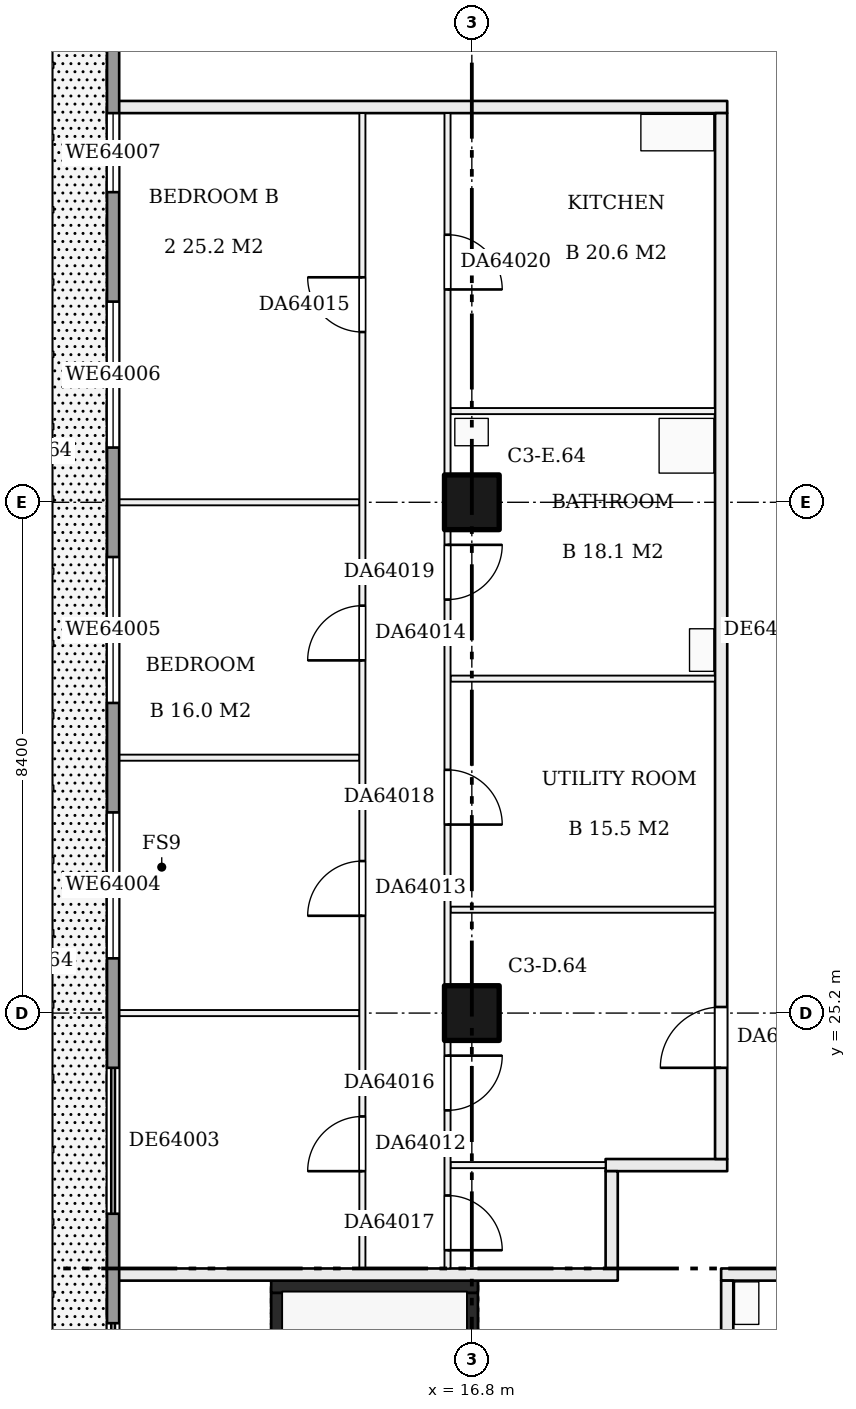
"""IFC4 building model, lengths in metres.
Left out: names, types, materials, properties, quantities, classifications, styles, units other than length and angle.
Written with IfcOpenShell. Run it as: python <this file> out.ifc"""

import sys

from ifc_helpers import new_model, si_unit, direction, frame, frame_2d, origin, origin_2d, place, context, subcontext, project, spatial, rectangle, extrude, element, fill, save


model = new_model("IFC4")
c1 = context("Model", 3, precision=1e-05, world=origin(), true_north=direction((0.0, 1.0)))
c2 = subcontext(c1, "Body", "Model", "MODEL_VIEW")
j1 = project(units=[si_unit("LENGTHUNIT", "METRE"), si_unit("PLANEANGLEUNIT", "RADIAN")], contexts=[c1])
p1 = place(None, origin())
s1 = spatial("IfcSite", under=j1, at=p1, CompositionType="ELEMENT")
p2 = place(p1, origin())
s2 = spatial("IfcBuilding", under=s1, at=p2, CompositionType="ELEMENT")
p3 = place(p2, frame((0.0, 0.0, 245.7)))
s3 = spatial("IfcBuildingStorey", under=s2, at=p3, CompositionType="ELEMENT", Elevation=245.7)
for number, where, z_axis, x_axis in (
    (1, (16.8, 25.2, 0.0), (0.0, 0.0, 1.0), (1.0, 0.0, 0.0)),
    (2, (16.8, 33.6, 0.0), (0.0, 0.0, 1.0), (1.0, 0.0, 0.0)),
):
    element("IfcColumn", number, at=place(p3, frame(where, z_axis=z_axis, x_axis=x_axis)), inside=s3, PredefinedType="COLUMN", context=c2, shape_type="SweptSolid", body=[
        extrude(rectangle(XDim=0.9, YDim=0.9, at=origin_2d()), origin(), (0.0, 0.0, 1.0), 3.22),
    ])
p4 = place(p3, frame((13.6, 13.8, 0.0), z_axis=(0.0, 0.0, 1.0), x_axis=(0.0, 1.0, 0.0)))
e3 = element("IfcWall", 3, at=p4, inside=s3, PredefinedType="SHEAR", context=c2, shape_type="SweptSolid", body=[
    extrude(rectangle(XDim=6.8, YDim=0.2, at=frame_2d((3.4, 0.0))), origin(), (0.0, 0.0, 1.0), 3.22),
])
p5 = place(p3, frame((16.8, 13.8, 0.0), z_axis=(0.0, 0.0, 1.0), x_axis=(0.0, 1.0, 0.0)))
e4 = element("IfcWall", 4, at=p5, inside=s3, PredefinedType="SHEAR", context=c2, shape_type="SweptSolid", body=[
    extrude(rectangle(XDim=6.8, YDim=0.2, at=frame_2d((3.4, 0.0))), origin(), (0.0, 0.0, 1.0), 3.22),
])
p6 = place(p5, frame((0.1, 0.0, 0.0)))
e5 = element("IfcOpeningElement", 5, at=p6, cuts=e4, PredefinedType="OPENING", context=c2, shape_type="SweptSolid", body=[
    extrude(rectangle(XDim=1.0, YDim=2.1, at=frame_2d((0.5, 1.05))), frame((0.0, 0.11, 0.0), z_axis=(0.0, -1.0, 0.0), x_axis=(1.0, 0.0, 0.0)), (0.0, 0.0, 1.0), 0.22),
])
p7 = place(p3, frame((13.5, 20.7, 0.0), z_axis=(0.0, 0.0, 1.0), x_axis=(1.0, 0.0, 0.0)))
e6 = element("IfcWall", 6, at=p7, inside=s3, PredefinedType="SHEAR", context=c2, shape_type="SweptSolid", body=[
    extrude(rectangle(XDim=3.4, YDim=0.2, at=frame_2d((1.7, 0.0))), origin(), (0.0, 0.0, 1.0), 3.22),
])
p8 = place(p3, frame((10.9, 20.9, 0.0), z_axis=(0.0, 0.0, 1.0), x_axis=(1.0, 0.0, 0.0)))
e7 = element("IfcWall", 7, at=p8, inside=s3, PredefinedType="PARTITIONING", context=c2, shape_type="SweptSolid", body=[
    extrude(rectangle(XDim=8.3, YDim=0.2, at=frame_2d((4.15, 0.0))), origin(), (0.0, 0.0, 1.0), 3.22),
])
p9 = place(p3, frame((20.9, 20.9, 0.0), z_axis=(0.0, 0.0, 1.0), x_axis=(1.0, 0.0, 0.0)))
e8 = element("IfcWall", 8, at=p9, inside=s3, PredefinedType="PARTITIONING", context=c2, shape_type="SweptSolid", body=[
    extrude(rectangle(XDim=19.3, YDim=0.2, at=frame_2d((9.65, 0.0))), origin(), (0.0, 0.0, 1.0), 3.22),
])
p10 = place(p9, frame((8.86, 0.0, 0.0)))
e9 = element("IfcOpeningElement", 9, at=p10, cuts=e8, PredefinedType="OPENING", context=c2, shape_type="SweptSolid", body=[
    extrude(rectangle(XDim=1.0, YDim=2.1, at=frame_2d((0.5, 1.05))), frame((0.0, 0.11, 0.0), z_axis=(0.0, -1.0, 0.0), x_axis=(1.0, 0.0, 0.0)), (0.0, 0.0, 1.0), 0.22),
])
p11 = place(p3, frame((16.45, 22.7, 0.0), z_axis=(0.0, 0.0, 1.0), x_axis=(1.0, 0.0, 0.0)))
e10 = element("IfcWall", 10, at=p11, inside=s3, PredefinedType="PARTITIONING", context=c2, shape_type="SweptSolid", body=[
    extrude(rectangle(XDim=2.55, YDim=0.1, at=frame_2d((1.275, 0.0))), origin(), (0.0, 0.0, 1.0), 3.22),
])
p12 = place(p3, frame((19.0, 22.7, 0.0), z_axis=(0.0, 0.0, 1.0), x_axis=(1.0, 0.0, 0.0)))
e11 = element("IfcWall", 11, at=p12, inside=s3, PredefinedType="PARTITIONING", context=c2, shape_type="SweptSolid", body=[
    extrude(rectangle(XDim=2.0, YDim=0.2, at=frame_2d((1.0, 0.0))), origin(), (0.0, 0.0, 1.0), 3.22),
])
p13 = place(p3, frame((10.9, 25.2, 0.0), z_axis=(0.0, 0.0, 1.0), x_axis=(1.0, 0.0, 0.0)))
e12 = element("IfcWall", 12, at=p13, inside=s3, PredefinedType="PARTITIONING", context=c2, shape_type="SweptSolid", body=[
    extrude(rectangle(XDim=4.05, YDim=0.1, at=frame_2d((2.025, 0.0))), origin(), (0.0, 0.0, 1.0), 3.22),
])
p14 = place(p3, frame((16.45, 26.9, 0.0), z_axis=(0.0, 0.0, 1.0), x_axis=(1.0, 0.0, 0.0)))
e13 = element("IfcWall", 13, at=p14, inside=s3, PredefinedType="PARTITIONING", context=c2, shape_type="SweptSolid", body=[
    extrude(rectangle(XDim=4.35, YDim=0.1, at=frame_2d((2.175, 0.0))), origin(), (0.0, 0.0, 1.0), 3.22),
])
p15 = place(p3, frame((10.9, 29.4, 0.0), z_axis=(0.0, 0.0, 1.0), x_axis=(1.0, 0.0, 0.0)))
e14 = element("IfcWall", 14, at=p15, inside=s3, PredefinedType="PARTITIONING", context=c2, shape_type="SweptSolid", body=[
    extrude(rectangle(XDim=4.05, YDim=0.1, at=frame_2d((2.025, 0.0))), origin(), (0.0, 0.0, 1.0), 3.22),
])
p16 = place(p3, frame((16.45, 30.7, 0.0), z_axis=(0.0, 0.0, 1.0), x_axis=(1.0, 0.0, 0.0)))
e15 = element("IfcWall", 15, at=p16, inside=s3, PredefinedType="PARTITIONING", context=c2, shape_type="SweptSolid", body=[
    extrude(rectangle(XDim=4.35, YDim=0.1, at=frame_2d((2.175, 0.0))), origin(), (0.0, 0.0, 1.0), 3.22),
])
p17 = place(p3, frame((10.9, 33.6, 0.0), z_axis=(0.0, 0.0, 1.0), x_axis=(1.0, 0.0, 0.0)))
e16 = element("IfcWall", 16, at=p17, inside=s3, PredefinedType="PARTITIONING", context=c2, shape_type="SweptSolid", body=[
    extrude(rectangle(XDim=4.05, YDim=0.1, at=frame_2d((2.025, 0.0))), origin(), (0.0, 0.0, 1.0), 3.22),
])
p18 = place(p3, frame((16.45, 35.1, 0.0), z_axis=(0.0, 0.0, 1.0), x_axis=(1.0, 0.0, 0.0)))
e17 = element("IfcWall", 17, at=p18, inside=s3, PredefinedType="PARTITIONING", context=c2, shape_type="SweptSolid", body=[
    extrude(rectangle(XDim=4.35, YDim=0.1, at=frame_2d((2.175, 0.0))), origin(), (0.0, 0.0, 1.0), 3.22),
])
p19 = place(p3, frame((10.9, 40.1, 0.0), z_axis=(0.0, 0.0, 1.0), x_axis=(1.0, 0.0, 0.0)))
e18 = element("IfcWall", 18, at=p19, inside=s3, PredefinedType="PARTITIONING", context=c2, shape_type="SweptSolid", body=[
    extrude(rectangle(XDim=10.1, YDim=0.2, at=frame_2d((5.05, 0.0))), origin(), (0.0, 0.0, 1.0), 3.22),
])
p20 = place(p3, frame((15.0, 21.0, 0.0), z_axis=(0.0, 0.0, 1.0), x_axis=(0.0, 1.0, 0.0)))
e19 = element("IfcWall", 19, at=p20, inside=s3, PredefinedType="PARTITIONING", context=c2, shape_type="SweptSolid", body=[
    extrude(rectangle(XDim=19.0, YDim=0.1, at=frame_2d((9.5, 0.0))), origin(), (0.0, 0.0, 1.0), 3.22),
])
p21 = place(p20, frame((1.6, 0.0, 0.0)))
e20 = element("IfcOpeningElement", 20, at=p21, cuts=e19, PredefinedType="OPENING", context=c2, shape_type="SweptSolid", body=[
    extrude(rectangle(XDim=0.9, YDim=2.1, at=frame_2d((0.45, 1.05))), frame((0.0, 0.06, 0.0), z_axis=(0.0, -1.0, 0.0), x_axis=(1.0, 0.0, 0.0)), (0.0, 0.0, 1.0), 0.12),
])
p22 = place(p20, frame((5.8, 0.0, 0.0)))
e21 = element("IfcOpeningElement", 21, at=p22, cuts=e19, PredefinedType="OPENING", context=c2, shape_type="SweptSolid", body=[
    extrude(rectangle(XDim=0.9, YDim=2.1, at=frame_2d((0.45, 1.05))), frame((0.0, 0.06, 0.0), z_axis=(0.0, -1.0, 0.0), x_axis=(1.0, 0.0, 0.0)), (0.0, 0.0, 1.0), 0.12),
])
p23 = place(p20, frame((10.0, 0.0, 0.0)))
e22 = element("IfcOpeningElement", 22, at=p23, cuts=e19, PredefinedType="OPENING", context=c2, shape_type="SweptSolid", body=[
    extrude(rectangle(XDim=0.9, YDim=2.1, at=frame_2d((0.45, 1.05))), frame((0.0, 0.06, 0.0), z_axis=(0.0, -1.0, 0.0), x_axis=(1.0, 0.0, 0.0)), (0.0, 0.0, 1.0), 0.12),
])
p24 = place(p20, frame((15.4, 0.0, 0.0)))
e23 = element("IfcOpeningElement", 23, at=p24, cuts=e19, PredefinedType="OPENING", context=c2, shape_type="SweptSolid", body=[
    extrude(rectangle(XDim=0.9, YDim=2.1, at=frame_2d((0.45, 1.05))), frame((0.0, 0.06, 0.0), z_axis=(0.0, -1.0, 0.0), x_axis=(1.0, 0.0, 0.0)), (0.0, 0.0, 1.0), 0.12),
])
p25 = place(p3, frame((16.4, 21.0, 0.0), z_axis=(0.0, 0.0, 1.0), x_axis=(0.0, 1.0, 0.0)))
e24 = element("IfcWall", 24, at=p25, inside=s3, PredefinedType="PARTITIONING", context=c2, shape_type="SweptSolid", body=[
    extrude(rectangle(XDim=19.0, YDim=0.1, at=frame_2d((9.5, 0.0))), origin(), (0.0, 0.0, 1.0), 3.22),
])
p26 = place(p25, frame((2.6, 0.0, 0.0)))
e25 = element("IfcOpeningElement", 25, at=p26, cuts=e24, PredefinedType="OPENING", context=c2, shape_type="SweptSolid", body=[
    extrude(rectangle(XDim=0.9, YDim=2.1, at=frame_2d((0.45, 1.05))), frame((0.0, 0.06, 0.0), z_axis=(0.0, -1.0, 0.0), x_axis=(1.0, 0.0, 0.0)), (0.0, 0.0, 1.0), 0.12),
])
p27 = place(p25, frame((0.3, 0.0, 0.0)))
e26 = element("IfcOpeningElement", 26, at=p27, cuts=e24, PredefinedType="OPENING", context=c2, shape_type="SweptSolid", body=[
    extrude(rectangle(XDim=0.9, YDim=2.1, at=frame_2d((0.45, 1.05))), frame((0.0, 0.06, 0.0), z_axis=(0.0, -1.0, 0.0), x_axis=(1.0, 0.0, 0.0)), (0.0, 0.0, 1.0), 0.12),
])
p28 = place(p25, frame((7.3, 0.0, 0.0)))
e27 = element("IfcOpeningElement", 27, at=p28, cuts=e24, PredefinedType="OPENING", context=c2, shape_type="SweptSolid", body=[
    extrude(rectangle(XDim=0.9, YDim=2.1, at=frame_2d((0.45, 1.05))), frame((0.0, 0.06, 0.0), z_axis=(0.0, -1.0, 0.0), x_axis=(1.0, 0.0, 0.0)), (0.0, 0.0, 1.0), 0.12),
])
p29 = place(p25, frame((11.0, 0.0, 0.0)))
e28 = element("IfcOpeningElement", 28, at=p29, cuts=e24, PredefinedType="OPENING", context=c2, shape_type="SweptSolid", body=[
    extrude(rectangle(XDim=0.9, YDim=2.1, at=frame_2d((0.45, 1.05))), frame((0.0, 0.06, 0.0), z_axis=(0.0, -1.0, 0.0), x_axis=(1.0, 0.0, 0.0)), (0.0, 0.0, 1.0), 0.12),
])
p30 = place(p25, frame((16.1, 0.0, 0.0)))
e29 = element("IfcOpeningElement", 29, at=p30, cuts=e24, PredefinedType="OPENING", context=c2, shape_type="SweptSolid", body=[
    extrude(rectangle(XDim=0.9, YDim=2.1, at=frame_2d((0.45, 1.05))), frame((0.0, 0.06, 0.0), z_axis=(0.0, -1.0, 0.0), x_axis=(1.0, 0.0, 0.0)), (0.0, 0.0, 1.0), 0.12),
])
p31 = place(p3, frame((19.1, 21.0, 0.0), z_axis=(0.0, 0.0, 1.0), x_axis=(0.0, 1.0, 0.0)))
e30 = element("IfcWall", 30, at=p31, inside=s3, PredefinedType="PARTITIONING", context=c2, shape_type="SweptSolid", body=[
    extrude(rectangle(XDim=1.6, YDim=0.2, at=frame_2d((0.8, 0.0))), origin(), (0.0, 0.0, 1.0), 3.22),
])
p32 = place(p3, frame((20.9, 22.8, 0.0), z_axis=(0.0, 0.0, 1.0), x_axis=(0.0, 1.0, 0.0)))
e31 = element("IfcWall", 31, at=p32, inside=s3, PredefinedType="PARTITIONING", context=c2, shape_type="SweptSolid", body=[
    extrude(rectangle(XDim=17.2, YDim=0.2, at=frame_2d((8.6, 0.0))), origin(), (0.0, 0.0, 1.0), 3.22),
])
p33 = place(p32, frame((1.5, 0.0, 0.0)))
e32 = element("IfcOpeningElement", 32, at=p33, cuts=e31, PredefinedType="OPENING", context=c2, shape_type="SweptSolid", body=[
    extrude(rectangle(XDim=1.0, YDim=2.1, at=frame_2d((0.5, 1.05))), frame((0.0, 0.11, 0.0), z_axis=(0.0, -1.0, 0.0), x_axis=(1.0, 0.0, 0.0)), (0.0, 0.0, 1.0), 0.22),
])
p34 = place(p3, frame((21.0, 13.7, 0.0), z_axis=(0.0, 0.0, 1.0), x_axis=(0.0, 1.0, 0.0)))
e33 = element("IfcWall", 33, at=p34, inside=s3, PredefinedType="PARTITIONING", context=c2, shape_type="SweptSolid", body=[
    extrude(rectangle(XDim=7.1, YDim=0.2, at=frame_2d((3.55, 0.0))), origin(), (0.0, 0.0, 1.0), 3.22),
])
p35 = place(p3, frame((10.9, 42.0, 0.0), z_axis=(0.0, 0.0, 1.0), x_axis=(0.0, -1.0, 0.0)))
e34 = element("IfcWall", 34, at=p35, inside=s3, PredefinedType="SOLIDWALL", context=c2, shape_type="SweptSolid", body=[
    extrude(rectangle(XDim=28.6, YDim=0.2, at=frame_2d((14.3, 0.0))), origin(), (0.0, 0.0, 1.0), 3.22),
])
p36 = place(p35, frame((25.9, 0.0, 0.0)))
e35 = element("IfcOpeningElement", 35, at=p36, cuts=e34, PredefinedType="OPENING", context=c2, shape_type="SweptSolid", body=[
    extrude(rectangle(XDim=2.4, YDim=2.2, at=frame_2d((1.2, 1.1))), frame((0.0, 0.11, 0.0), z_axis=(0.0, -1.0, 0.0), x_axis=(1.0, 0.0, 0.0)), (0.0, 0.0, 1.0), 0.22),
])
p37 = place(p35, frame((21.9, 0.0, 0.0)))
e36 = element("IfcOpeningElement", 36, at=p37, cuts=e34, PredefinedType="OPENING", context=c2, shape_type="SweptSolid", body=[
    extrude(rectangle(XDim=2.4, YDim=2.2, at=frame_2d((1.2, 1.1))), frame((0.0, 0.11, 0.0), z_axis=(0.0, -1.0, 0.0), x_axis=(1.0, 0.0, 0.0)), (0.0, 0.0, 1.0), 0.22),
])
p38 = place(p35, frame((17.7, 0.0, 0.0)))
e37 = element("IfcOpeningElement", 37, at=p38, cuts=e34, PredefinedType="OPENING", context=c2, shape_type="SweptSolid", body=[
    extrude(rectangle(XDim=2.4, YDim=2.2, at=frame_2d((1.2, 1.1))), frame((0.0, 0.11, 0.0), z_axis=(0.0, -1.0, 0.0), x_axis=(1.0, 0.0, 0.0)), (0.0, 0.0, 1.0), 0.22),
])
p39 = place(p35, frame((13.5, 0.0, 0.9)))
e38 = element("IfcOpeningElement", 38, at=p39, cuts=e34, PredefinedType="OPENING", context=c2, shape_type="SweptSolid", body=[
    extrude(rectangle(XDim=2.4, YDim=1.5, at=frame_2d((1.2, 0.75))), frame((0.0, 0.11, 0.0), z_axis=(0.0, -1.0, 0.0), x_axis=(1.0, 0.0, 0.0)), (0.0, 0.0, 1.0), 0.22),
])
p40 = place(p35, frame((9.3, 0.0, 0.9)))
e39 = element("IfcOpeningElement", 39, at=p40, cuts=e34, PredefinedType="OPENING", context=c2, shape_type="SweptSolid", body=[
    extrude(rectangle(XDim=2.4, YDim=1.5, at=frame_2d((1.2, 0.75))), frame((0.0, 0.11, 0.0), z_axis=(0.0, -1.0, 0.0), x_axis=(1.0, 0.0, 0.0)), (0.0, 0.0, 1.0), 0.22),
])
p41 = place(p35, frame((5.1, 0.0, 0.9)))
e40 = element("IfcOpeningElement", 40, at=p41, cuts=e34, PredefinedType="OPENING", context=c2, shape_type="SweptSolid", body=[
    extrude(rectangle(XDim=2.4, YDim=1.5, at=frame_2d((1.2, 0.75))), frame((0.0, 0.11, 0.0), z_axis=(0.0, -1.0, 0.0), x_axis=(1.0, 0.0, 0.0)), (0.0, 0.0, 1.0), 0.22),
])
p42 = place(p35, frame((2.0, 0.0, 0.9)))
e41 = element("IfcOpeningElement", 41, at=p42, cuts=e34, PredefinedType="OPENING", context=c2, shape_type="SweptSolid", body=[
    extrude(rectangle(XDim=1.3, YDim=1.5, at=frame_2d((0.65, 0.75))), frame((0.0, 0.11, 0.0), z_axis=(0.0, -1.0, 0.0), x_axis=(1.0, 0.0, 0.0)), (0.0, 0.0, 1.0), 0.22),
])
p43 = place(p21, origin())
e42 = element("IfcDoor", 42, at=p43, inside=s3, OperationType="SINGLE_SWING_LEFT", PredefinedType="DOOR", context=c2, shape_type="SweptSolid", body=[
    extrude(rectangle(XDim=0.9, YDim=2.1, at=frame_2d((0.45, 1.05))), frame((0.0, 0.025, 0.0), z_axis=(0.0, -1.0, 0.0), x_axis=(1.0, 0.0, 0.0)), (0.0, 0.0, 1.0), 0.05),
])
fill(e20, e42)
p44 = place(p22, origin())
e43 = element("IfcDoor", 43, at=p44, inside=s3, OperationType="SINGLE_SWING_LEFT", PredefinedType="DOOR", context=c2, shape_type="SweptSolid", body=[
    extrude(rectangle(XDim=0.9, YDim=2.1, at=frame_2d((0.45, 1.05))), frame((0.0, 0.025, 0.0), z_axis=(0.0, -1.0, 0.0), x_axis=(1.0, 0.0, 0.0)), (0.0, 0.0, 1.0), 0.05),
])
fill(e21, e43)
p45 = place(p23, origin())
e44 = element("IfcDoor", 44, at=p45, inside=s3, OperationType="SINGLE_SWING_LEFT", PredefinedType="DOOR", context=c2, shape_type="SweptSolid", body=[
    extrude(rectangle(XDim=0.9, YDim=2.1, at=frame_2d((0.45, 1.05))), frame((0.0, 0.025, 0.0), z_axis=(0.0, -1.0, 0.0), x_axis=(1.0, 0.0, 0.0)), (0.0, 0.0, 1.0), 0.05),
])
fill(e22, e44)
p46 = place(p24, origin())
e45 = element("IfcDoor", 45, at=p46, inside=s3, OperationType="SINGLE_SWING_RIGHT", PredefinedType="DOOR", context=c2, shape_type="SweptSolid", body=[
    extrude(rectangle(XDim=0.9, YDim=2.1, at=frame_2d((0.45, 1.05))), frame((0.0, 0.025, 0.0), z_axis=(0.0, -1.0, 0.0), x_axis=(1.0, 0.0, 0.0)), (0.0, 0.0, 1.0), 0.05),
])
fill(e23, e45)
p47 = place(p26, frame((0.9, 0.0, 0.0), z_axis=(0.0, 0.0, 1.0), x_axis=(-1.0, 0.0, 0.0)))
e46 = element("IfcDoor", 46, at=p47, inside=s3, OperationType="SINGLE_SWING_LEFT", PredefinedType="DOOR", context=c2, shape_type="SweptSolid", body=[
    extrude(rectangle(XDim=0.9, YDim=2.1, at=frame_2d((0.45, 1.05))), frame((0.0, 0.025, 0.0), z_axis=(0.0, -1.0, 0.0), x_axis=(1.0, 0.0, 0.0)), (0.0, 0.0, 1.0), 0.05),
])
fill(e25, e46)
p48 = place(p27, frame((0.9, 0.0, 0.0), z_axis=(0.0, 0.0, 1.0), x_axis=(-1.0, 0.0, 0.0)))
e47 = element("IfcDoor", 47, at=p48, inside=s3, OperationType="SINGLE_SWING_RIGHT", PredefinedType="DOOR", context=c2, shape_type="SweptSolid", body=[
    extrude(rectangle(XDim=0.9, YDim=2.1, at=frame_2d((0.45, 1.05))), frame((0.0, 0.025, 0.0), z_axis=(0.0, -1.0, 0.0), x_axis=(1.0, 0.0, 0.0)), (0.0, 0.0, 1.0), 0.05),
])
fill(e26, e47)
p49 = place(p28, frame((0.9, 0.0, 0.0), z_axis=(0.0, 0.0, 1.0), x_axis=(-1.0, 0.0, 0.0)))
e48 = element("IfcDoor", 48, at=p49, inside=s3, OperationType="SINGLE_SWING_RIGHT", PredefinedType="DOOR", context=c2, shape_type="SweptSolid", body=[
    extrude(rectangle(XDim=0.9, YDim=2.1, at=frame_2d((0.45, 1.05))), frame((0.0, 0.025, 0.0), z_axis=(0.0, -1.0, 0.0), x_axis=(1.0, 0.0, 0.0)), (0.0, 0.0, 1.0), 0.05),
])
fill(e27, e48)
p50 = place(p29, frame((0.9, 0.0, 0.0), z_axis=(0.0, 0.0, 1.0), x_axis=(-1.0, 0.0, 0.0)))
e49 = element("IfcDoor", 49, at=p50, inside=s3, OperationType="SINGLE_SWING_LEFT", PredefinedType="DOOR", context=c2, shape_type="SweptSolid", body=[
    extrude(rectangle(XDim=0.9, YDim=2.1, at=frame_2d((0.45, 1.05))), frame((0.0, 0.025, 0.0), z_axis=(0.0, -1.0, 0.0), x_axis=(1.0, 0.0, 0.0)), (0.0, 0.0, 1.0), 0.05),
])
fill(e28, e49)
p51 = place(p30, frame((0.9, 0.0, 0.0), z_axis=(0.0, 0.0, 1.0), x_axis=(-1.0, 0.0, 0.0)))
e50 = element("IfcDoor", 50, at=p51, inside=s3, OperationType="SINGLE_SWING_RIGHT", PredefinedType="DOOR", context=c2, shape_type="SweptSolid", body=[
    extrude(rectangle(XDim=0.9, YDim=2.1, at=frame_2d((0.45, 1.05))), frame((0.0, 0.025, 0.0), z_axis=(0.0, -1.0, 0.0), x_axis=(1.0, 0.0, 0.0)), (0.0, 0.0, 1.0), 0.05),
])
fill(e29, e50)
p52 = place(p33, origin())
e51 = element("IfcDoor", 51, at=p52, inside=s3, OperationType="SINGLE_SWING_LEFT", PredefinedType="DOOR", context=c2, shape_type="SweptSolid", body=[
    extrude(rectangle(XDim=1.0, YDim=2.1, at=frame_2d((0.5, 1.05))), frame((0.0, 0.025, 0.0), z_axis=(0.0, -1.0, 0.0), x_axis=(1.0, 0.0, 0.0)), (0.0, 0.0, 1.0), 0.05),
])
fill(e32, e51)
p53 = place(p37, origin())
e52 = element("IfcDoor", 52, at=p53, inside=s3, OperationType="DOUBLE_DOOR_SLIDING", PredefinedType="DOOR", context=c2, shape_type="SweptSolid", body=[
    extrude(rectangle(XDim=2.4, YDim=2.2, at=frame_2d((1.2, 1.1))), frame((0.0, 0.025, 0.0), z_axis=(0.0, -1.0, 0.0), x_axis=(1.0, 0.0, 0.0)), (0.0, 0.0, 1.0), 0.05),
])
fill(e36, e52)
p54 = place(p38, origin())
e53 = element("IfcDoor", 53, at=p54, inside=s3, OperationType="DOUBLE_DOOR_SLIDING", PredefinedType="DOOR", context=c2, shape_type="SweptSolid", body=[
    extrude(rectangle(XDim=2.4, YDim=2.2, at=frame_2d((1.2, 1.1))), frame((0.0, 0.025, 0.0), z_axis=(0.0, -1.0, 0.0), x_axis=(1.0, 0.0, 0.0)), (0.0, 0.0, 1.0), 0.05),
])
fill(e37, e53)
p55 = place(p39, origin())
e54 = element("IfcWindow", 54, at=p55, inside=s3, PartitioningType="SINGLE_PANEL", PredefinedType="WINDOW", context=c2, shape_type="SweptSolid", body=[
    extrude(rectangle(XDim=2.4, YDim=1.5, at=frame_2d((1.2, 0.75))), frame((0.0, 0.03, 0.0), z_axis=(0.0, -1.0, 0.0), x_axis=(1.0, 0.0, 0.0)), (0.0, 0.0, 1.0), 0.06),
])
fill(e38, e54)
p56 = place(p40, origin())
e55 = element("IfcWindow", 55, at=p56, inside=s3, PartitioningType="SINGLE_PANEL", PredefinedType="WINDOW", context=c2, shape_type="SweptSolid", body=[
    extrude(rectangle(XDim=2.4, YDim=1.5, at=frame_2d((1.2, 0.75))), frame((0.0, 0.03, 0.0), z_axis=(0.0, -1.0, 0.0), x_axis=(1.0, 0.0, 0.0)), (0.0, 0.0, 1.0), 0.06),
])
fill(e39, e55)
p57 = place(p41, origin())
e56 = element("IfcWindow", 56, at=p57, inside=s3, PartitioningType="SINGLE_PANEL", PredefinedType="WINDOW", context=c2, shape_type="SweptSolid", body=[
    extrude(rectangle(XDim=2.4, YDim=1.5, at=frame_2d((1.2, 0.75))), frame((0.0, 0.03, 0.0), z_axis=(0.0, -1.0, 0.0), x_axis=(1.0, 0.0, 0.0)), (0.0, 0.0, 1.0), 0.06),
])
fill(e40, e56)
p58 = place(p42, origin())
e57 = element("IfcWindow", 57, at=p58, inside=s3, PartitioningType="SINGLE_PANEL", PredefinedType="WINDOW", context=c2, shape_type="SweptSolid", body=[
    extrude(rectangle(XDim=1.3, YDim=1.5, at=frame_2d((0.65, 0.75))), frame((0.0, 0.03, 0.0), z_axis=(0.0, -1.0, 0.0), x_axis=(1.0, 0.0, 0.0)), (0.0, 0.0, 1.0), 0.06),
])
fill(e41, e57)
save(model, sys.argv[1])
